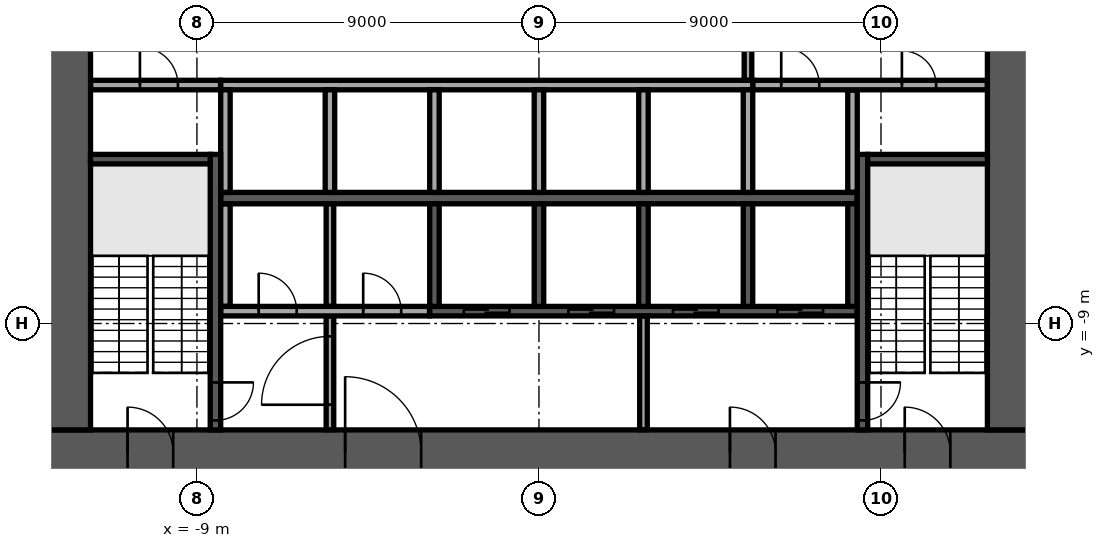
"""IFC4 building model, lengths in metres.
Left out: names, types, materials, properties, quantities, classifications, styles, units other than length and angle.
Written with IfcOpenShell. Run it as: python <this file> out.ifc"""

import sys

from ifc_helpers import new_model, si_unit, direction, frame, frame_2d, origin, place, context, subcontext, project, spatial, rectangle, extrude, element, fill, save


model = new_model("IFC4")
c1 = context("Model", 3, precision=1e-05, world=origin(), true_north=direction((0.0, 1.0)))
c2 = subcontext(c1, "Body", "Model", "MODEL_VIEW")
j1 = project(units=[si_unit("LENGTHUNIT", "METRE"), si_unit("PLANEANGLEUNIT", "RADIAN")], contexts=[c1])
p1 = place(None, origin())
s1 = spatial("IfcSite", under=j1, at=p1, CompositionType="ELEMENT")
p2 = place(p1, origin())
s2 = spatial("IfcBuilding", under=s1, at=p2, CompositionType="ELEMENT")
p3 = place(p2, frame((0.0, 0.0, 18.0)))
s3 = spatial("IfcBuildingStorey", under=s2, at=p3, CompositionType="ELEMENT", Elevation=18.0)
p4 = place(p3, frame((-13.0, -12.4, 0.0), z_axis=(0.0, 0.0, 1.0), x_axis=(1.0, 0.0, 0.0)))
e1 = element("IfcWall", 1, at=p4, inside=s3, PredefinedType="SHEAR", context=c2, shape_type="SweptSolid", body=[
    extrude(rectangle(XDim=26.0, YDim=1.2, at=frame_2d((13.0, 0.0))), origin(), (0.0, 0.0, 1.0), 4.05),
])
p5 = place(p4, frame((7.9, 0.0, 0.0)))
e2 = element("IfcOpeningElement", 2, at=p5, cuts=e1, PredefinedType="OPENING", context=c2, shape_type="SweptSolid", body=[
    extrude(rectangle(XDim=2.0, YDim=2.1, at=frame_2d((1.0, 1.05))), frame((0.0, 0.61, 0.0), z_axis=(0.0, -1.0, 0.0), x_axis=(1.0, 0.0, 0.0)), (0.0, 0.0, 1.0), 1.22),
])
p6 = place(p4, frame((18.025, 0.0, 0.0)))
e3 = element("IfcOpeningElement", 3, at=p6, cuts=e1, PredefinedType="OPENING", context=c2, shape_type="SweptSolid", body=[
    extrude(rectangle(XDim=1.2, YDim=2.1, at=frame_2d((0.6, 1.05))), frame((0.0, 0.61, 0.0), z_axis=(0.0, -1.0, 0.0), x_axis=(1.0, 0.0, 0.0)), (0.0, 0.0, 1.0), 1.22),
])
p7 = place(p4, frame((2.175, 0.0, 0.0)))
e4 = element("IfcOpeningElement", 4, at=p7, cuts=e1, PredefinedType="OPENING", context=c2, shape_type="SweptSolid", body=[
    extrude(rectangle(XDim=1.2, YDim=2.1, at=frame_2d((0.6, 1.05))), frame((0.0, 0.61, 0.0), z_axis=(0.0, -1.0, 0.0), x_axis=(1.0, 0.0, 0.0)), (0.0, 0.0, 1.0), 1.22),
])
p8 = place(p4, frame((22.625, 0.0, 0.0)))
e5 = element("IfcOpeningElement", 5, at=p8, cuts=e1, PredefinedType="OPENING", context=c2, shape_type="SweptSolid", body=[
    extrude(rectangle(XDim=1.2, YDim=2.1, at=frame_2d((0.6, 1.05))), frame((0.0, 0.61, 0.0), z_axis=(0.0, -1.0, 0.0), x_axis=(1.0, 0.0, 0.0)), (0.0, 0.0, 1.0), 1.22),
])
p9 = place(p3, frame((12.4, -11.8, 0.0), z_axis=(0.0, 0.0, 1.0), x_axis=(0.0, 1.0, 0.0)))
e6 = element("IfcWall", 6, at=p9, inside=s3, PredefinedType="SHEAR", context=c2, shape_type="SweptSolid", body=[
    extrude(rectangle(XDim=23.6, YDim=1.2, at=frame_2d((11.8, 0.0))), origin(), (0.0, 0.0, 1.0), 4.05),
])
p10 = place(p9, frame((10.6, 0.0, 0.0)))
e7 = element("IfcOpeningElement", 7, at=p10, cuts=e6, PredefinedType="OPENING", context=c2, shape_type="SweptSolid", body=[
    extrude(rectangle(XDim=2.4, YDim=2.4, at=frame_2d((1.2, 1.2))), frame((0.0, 0.61, 0.0), z_axis=(0.0, -1.0, 0.0), x_axis=(1.0, 0.0, 0.0)), (0.0, 0.0, 1.0), 1.22),
])
p11 = place(p3, frame((-12.4, -11.8, 0.0), z_axis=(0.0, 0.0, 1.0), x_axis=(0.0, 1.0, 0.0)))
e8 = element("IfcWall", 8, at=p11, inside=s3, PredefinedType="SHEAR", context=c2, shape_type="SweptSolid", body=[
    extrude(rectangle(XDim=23.6, YDim=1.2, at=frame_2d((11.8, 0.0))), origin(), (0.0, 0.0, 1.0), 4.05),
])
p12 = place(p11, frame((10.6, 0.0, 0.0)))
e9 = element("IfcOpeningElement", 9, at=p12, cuts=e8, PredefinedType="OPENING", context=c2, shape_type="SweptSolid", body=[
    extrude(rectangle(XDim=2.4, YDim=2.4, at=frame_2d((1.2, 1.2))), frame((0.0, 0.61, 0.0), z_axis=(0.0, -1.0, 0.0), x_axis=(1.0, 0.0, 0.0)), (0.0, 0.0, 1.0), 1.22),
])
p13 = place(p3, frame((-8.375, -5.7, 0.0), z_axis=(0.0, 0.0, 1.0), x_axis=(1.0, 0.0, 0.0)))
e10 = element("IfcWall", 10, at=p13, inside=s3, PredefinedType="SOLIDWALL", context=c2, shape_type="SweptSolid", body=[
    extrude(rectangle(XDim=16.75, YDim=0.3, at=frame_2d((8.375, 0.0))), origin(), (0.0, 0.0, 1.0), 4.05),
])
p14 = place(p3, frame((-8.375, -2.725, 0.0), z_axis=(0.0, 0.0, 1.0), x_axis=(1.0, 0.0, 0.0)))
e11 = element("IfcWall", 11, at=p14, inside=s3, PredefinedType="SOLIDWALL", context=c2, shape_type="SweptSolid", body=[
    extrude(rectangle(XDim=14.0, YDim=0.25, at=frame_2d((7.0, 0.0))), origin(), (0.0, 0.0, 1.0), 4.05),
])
for number, where, z_axis, x_axis in (
    (12, (-8.25, -5.55, 0.0), (0.0, 0.0, 1.0), (0.0, 1.0, 0.0)),
    (13, (-5.5, -5.55, 0.0), (0.0, 0.0, 1.0), (0.0, 1.0, 0.0)),
    (14, (-2.75, -5.55, 0.0), (0.0, 0.0, 1.0), (0.0, 1.0, 0.0)),
    (15, (0.0, -5.55, 0.0), (0.0, 0.0, 1.0), (0.0, 1.0, 0.0)),
    (16, (2.75, -5.55, 0.0), (0.0, 0.0, 1.0), (0.0, 1.0, 0.0)),
    (17, (5.5, -5.55, 0.0), (0.0, 0.0, 1.0), (0.0, 1.0, 0.0)),
):
    element("IfcWall", number, at=place(p3, frame(where, z_axis=z_axis, x_axis=x_axis)), inside=s3, PredefinedType="SOLIDWALL", context=c2, shape_type="SweptSolid", body=[
        extrude(rectangle(XDim=2.7, YDim=0.25, at=frame_2d((1.35, 0.0))), origin(), (0.0, 0.0, 1.0), 4.05),
    ])
p15 = place(p3, frame((-2.875, -8.675, 0.0), z_axis=(0.0, 0.0, 1.0), x_axis=(1.0, 0.0, 0.0)))
e18 = element("IfcWall", 18, at=p15, inside=s3, PredefinedType="SOLIDWALL", context=c2, shape_type="SweptSolid", body=[
    extrude(rectangle(XDim=11.25, YDim=0.25, at=frame_2d((5.625, 0.0))), origin(), (0.0, 0.0, 1.0), 4.05),
])
p16 = place(p15, frame((0.9, 0.0, 0.0)))
e19 = element("IfcOpeningElement", 19, at=p16, cuts=e18, PredefinedType="OPENING", context=c2, shape_type="SweptSolid", body=[
    extrude(rectangle(XDim=1.2, YDim=2.1, at=frame_2d((0.6, 1.05))), frame((0.0, 0.135, 0.0), z_axis=(0.0, -1.0, 0.0), x_axis=(1.0, 0.0, 0.0)), (0.0, 0.0, 1.0), 0.27),
])
p17 = place(p15, frame((3.65, 0.0, 0.0)))
e20 = element("IfcOpeningElement", 20, at=p17, cuts=e18, PredefinedType="OPENING", context=c2, shape_type="SweptSolid", body=[
    extrude(rectangle(XDim=1.2, YDim=2.1, at=frame_2d((0.6, 1.05))), frame((0.0, 0.135, 0.0), z_axis=(0.0, -1.0, 0.0), x_axis=(1.0, 0.0, 0.0)), (0.0, 0.0, 1.0), 0.27),
])
p18 = place(p15, frame((6.4, 0.0, 0.0)))
e21 = element("IfcOpeningElement", 21, at=p18, cuts=e18, PredefinedType="OPENING", context=c2, shape_type="SweptSolid", body=[
    extrude(rectangle(XDim=1.2, YDim=2.1, at=frame_2d((0.6, 1.05))), frame((0.0, 0.135, 0.0), z_axis=(0.0, -1.0, 0.0), x_axis=(1.0, 0.0, 0.0)), (0.0, 0.0, 1.0), 0.27),
])
p19 = place(p15, frame((9.15, 0.0, 0.0)))
e22 = element("IfcOpeningElement", 22, at=p19, cuts=e18, PredefinedType="OPENING", context=c2, shape_type="SweptSolid", body=[
    extrude(rectangle(XDim=1.2, YDim=2.1, at=frame_2d((0.6, 1.05))), frame((0.0, 0.135, 0.0), z_axis=(0.0, -1.0, 0.0), x_axis=(1.0, 0.0, 0.0)), (0.0, 0.0, 1.0), 0.27),
])
for number, where, z_axis, x_axis in (
    (23, (-2.75, -8.55, 0.0), (0.0, 0.0, 1.0), (0.0, 1.0, 0.0)),
    (24, (0.0, -8.55, 0.0), (0.0, 0.0, 1.0), (0.0, 1.0, 0.0)),
    (25, (2.75, -8.55, 0.0), (0.0, 0.0, 1.0), (0.0, 1.0, 0.0)),
    (26, (5.5, -8.55, 0.0), (0.0, 0.0, 1.0), (0.0, 1.0, 0.0)),
    (27, (8.25, -8.55, 0.0), (0.0, 0.0, 1.0), (0.0, 1.0, 0.0)),
):
    element("IfcWall", number, at=place(p3, frame(where, z_axis=z_axis, x_axis=x_axis)), inside=s3, PredefinedType="SOLIDWALL", context=c2, shape_type="SweptSolid", body=[
        extrude(rectangle(XDim=2.7, YDim=0.25, at=frame_2d((1.35, 0.0))), origin(), (0.0, 0.0, 1.0), 4.05),
    ])
p20 = place(p3, frame((-8.512, -4.55, 0.0), z_axis=(0.0, 0.0, 1.0), x_axis=(0.0, -1.0, 0.0)))
e28 = element("IfcWall", 28, at=p20, inside=s3, PredefinedType="SOLIDWALL", context=c2, shape_type="SweptSolid", body=[
    extrude(rectangle(XDim=7.25, YDim=0.275, at=frame_2d((3.625, 0.0))), origin(), (0.0, 0.0, 1.0), 4.05),
])
p21 = place(p20, frame((6.0, 0.0, 0.0)))
e29 = element("IfcOpeningElement", 29, at=p21, cuts=e28, PredefinedType="OPENING", context=c2, shape_type="SweptSolid", body=[
    extrude(rectangle(XDim=1.0, YDim=2.1, at=frame_2d((0.5, 1.05))), frame((0.0, 0.147, 0.0), z_axis=(0.0, -1.0, 0.0), x_axis=(1.0, 0.0, 0.0)), (0.0, 0.0, 1.0), 0.295),
])
p22 = place(p3, frame((-8.65, -4.675, 0.0), z_axis=(0.0, 0.0, 1.0), x_axis=(-1.0, 0.0, 0.0)))
e30 = element("IfcWall", 30, at=p22, inside=s3, PredefinedType="SOLIDWALL", context=c2, shape_type="SweptSolid", body=[
    extrude(rectangle(XDim=3.15, YDim=0.25, at=frame_2d((1.575, 0.0))), origin(), (0.0, 0.0, 1.0), 4.05),
])
p23 = place(p3, frame((8.512, -4.55, 0.0), z_axis=(0.0, 0.0, 1.0), x_axis=(0.0, -1.0, 0.0)))
e31 = element("IfcWall", 31, at=p23, inside=s3, PredefinedType="SOLIDWALL", context=c2, shape_type="SweptSolid", body=[
    extrude(rectangle(XDim=7.25, YDim=0.275, at=frame_2d((3.625, 0.0))), origin(), (0.0, 0.0, 1.0), 4.05),
])
p24 = place(p23, frame((6.0, 0.0, 0.0)))
e32 = element("IfcOpeningElement", 32, at=p24, cuts=e31, PredefinedType="OPENING", context=c2, shape_type="SweptSolid", body=[
    extrude(rectangle(XDim=1.0, YDim=2.1, at=frame_2d((0.5, 1.05))), frame((0.0, 0.147, 0.0), z_axis=(0.0, -1.0, 0.0), x_axis=(1.0, 0.0, 0.0)), (0.0, 0.0, 1.0), 0.295),
])
p25 = place(p3, frame((8.65, -4.675, 0.0), z_axis=(0.0, 0.0, 1.0), x_axis=(1.0, 0.0, 0.0)))
e33 = element("IfcWall", 33, at=p25, inside=s3, PredefinedType="SOLIDWALL", context=c2, shape_type="SweptSolid", body=[
    extrude(rectangle(XDim=3.15, YDim=0.25, at=frame_2d((1.575, 0.0))), origin(), (0.0, 0.0, 1.0), 4.05),
])
p26 = place(p3, frame((-5.5, -11.795, 0.0), z_axis=(0.0, 0.0, 1.0), x_axis=(0.0, 1.0, 0.0)))
e34 = element("IfcWall", 34, at=p26, inside=s3, PredefinedType="PARTITIONING", context=c2, shape_type="SweptSolid", body=[
    extrude(rectangle(XDim=2.99, YDim=0.2, at=frame_2d((1.495, 0.0))), origin(), (0.0, 0.0, 1.0), 4.05),
])
p27 = place(p26, frame((0.657, 0.0, 0.0)))
e35 = element("IfcOpeningElement", 35, at=p27, cuts=e34, PredefinedType="OPENING", context=c2, shape_type="SweptSolid", body=[
    extrude(rectangle(XDim=1.8, YDim=2.1, at=frame_2d((0.9, 1.05))), frame((0.0, 0.11, 0.0), z_axis=(0.0, -1.0, 0.0), x_axis=(1.0, 0.0, 0.0)), (0.0, 0.0, 1.0), 0.22),
])
p28 = place(p3, frame((2.75, -11.795, 0.0), z_axis=(0.0, 0.0, 1.0), x_axis=(0.0, 1.0, 0.0)))
e36 = element("IfcWall", 36, at=p28, inside=s3, PredefinedType="PARTITIONING", context=c2, shape_type="SweptSolid", body=[
    extrude(rectangle(XDim=2.99, YDim=0.2, at=frame_2d((1.495, 0.0))), origin(), (0.0, 0.0, 1.0), 4.05),
])
p29 = place(p3, frame((-8.37, -8.675, 0.0), z_axis=(0.0, 0.0, 1.0), x_axis=(1.0, 0.0, 0.0)))
e37 = element("IfcWall", 37, at=p29, inside=s3, PredefinedType="PARTITIONING", context=c2, shape_type="SweptSolid", body=[
    extrude(rectangle(XDim=5.49, YDim=0.25, at=frame_2d((2.745, 0.0))), origin(), (0.0, 0.0, 1.0), 4.05),
])
p30 = place(p29, frame((0.995, 0.0, 0.0)))
e38 = element("IfcOpeningElement", 38, at=p30, cuts=e37, PredefinedType="OPENING", context=c2, shape_type="SweptSolid", body=[
    extrude(rectangle(XDim=1.0, YDim=2.1, at=frame_2d((0.5, 1.05))), frame((0.0, 0.135, 0.0), z_axis=(0.0, -1.0, 0.0), x_axis=(1.0, 0.0, 0.0)), (0.0, 0.0, 1.0), 0.27),
])
p31 = place(p29, frame((3.745, 0.0, 0.0)))
e39 = element("IfcOpeningElement", 39, at=p31, cuts=e37, PredefinedType="OPENING", context=c2, shape_type="SweptSolid", body=[
    extrude(rectangle(XDim=1.0, YDim=2.1, at=frame_2d((0.5, 1.05))), frame((0.0, 0.135, 0.0), z_axis=(0.0, -1.0, 0.0), x_axis=(1.0, 0.0, 0.0)), (0.0, 0.0, 1.0), 0.27),
])
p32 = place(p3, frame((-8.25, -8.545, 0.0), z_axis=(0.0, 0.0, 1.0), x_axis=(0.0, 1.0, 0.0)))
e40 = element("IfcWall", 40, at=p32, inside=s3, PredefinedType="PARTITIONING", context=c2, shape_type="SweptSolid", body=[
    extrude(rectangle(XDim=2.69, YDim=0.25, at=frame_2d((1.345, 0.0))), origin(), (0.0, 0.0, 1.0), 4.05),
])
p33 = place(p3, frame((-5.5, -8.545, 0.0), z_axis=(0.0, 0.0, 1.0), x_axis=(0.0, 1.0, 0.0)))
e41 = element("IfcWall", 41, at=p33, inside=s3, PredefinedType="PARTITIONING", context=c2, shape_type="SweptSolid", body=[
    extrude(rectangle(XDim=2.69, YDim=0.2, at=frame_2d((1.345, 0.0))), origin(), (0.0, 0.0, 1.0), 4.05),
])
p34 = place(p3, frame((8.25, -5.545, 0.0), z_axis=(0.0, 0.0, 1.0), x_axis=(0.0, 1.0, 0.0)))
e42 = element("IfcWall", 42, at=p34, inside=s3, PredefinedType="PARTITIONING", context=c2, shape_type="SweptSolid", body=[
    extrude(rectangle(XDim=2.69, YDim=0.25, at=frame_2d((1.345, 0.0))), origin(), (0.0, 0.0, 1.0), 4.05),
])
p35 = place(p3, frame((-11.795, -2.725, 0.0), z_axis=(0.0, 0.0, 1.0), x_axis=(1.0, 0.0, 0.0)))
e43 = element("IfcWall", 43, at=p35, inside=s3, PredefinedType="PARTITIONING", context=c2, shape_type="SweptSolid", body=[
    extrude(rectangle(XDim=3.415, YDim=0.25, at=frame_2d((1.708, 0.0))), origin(), (0.0, 0.0, 1.0), 4.05),
])
p36 = place(p35, frame((1.295, 0.0, 0.0)))
e44 = element("IfcOpeningElement", 44, at=p36, cuts=e43, PredefinedType="OPENING", context=c2, shape_type="SweptSolid", body=[
    extrude(rectangle(XDim=1.0, YDim=2.1, at=frame_2d((0.5, 1.05))), frame((0.0, 0.135, 0.0), z_axis=(0.0, -1.0, 0.0), x_axis=(1.0, 0.0, 0.0)), (0.0, 0.0, 1.0), 0.27),
])
p37 = place(p3, frame((5.63, -2.725, 0.0), z_axis=(0.0, 0.0, 1.0), x_axis=(1.0, 0.0, 0.0)))
e45 = element("IfcWall", 45, at=p37, inside=s3, PredefinedType="PARTITIONING", context=c2, shape_type="SweptSolid", body=[
    extrude(rectangle(XDim=6.165, YDim=0.25, at=frame_2d((3.083, 0.0))), origin(), (0.0, 0.0, 1.0), 4.05),
])
p38 = place(p37, frame((0.745, 0.0, 0.0)))
e46 = element("IfcOpeningElement", 46, at=p38, cuts=e45, PredefinedType="OPENING", context=c2, shape_type="SweptSolid", body=[
    extrude(rectangle(XDim=1.0, YDim=2.1, at=frame_2d((0.5, 1.05))), frame((0.0, 0.135, 0.0), z_axis=(0.0, -1.0, 0.0), x_axis=(1.0, 0.0, 0.0)), (0.0, 0.0, 1.0), 0.27),
])
p39 = place(p37, frame((3.92, 0.0, 0.0)))
e47 = element("IfcOpeningElement", 47, at=p39, cuts=e45, PredefinedType="OPENING", context=c2, shape_type="SweptSolid", body=[
    extrude(rectangle(XDim=0.9, YDim=2.1, at=frame_2d((0.45, 1.05))), frame((0.0, 0.135, 0.0), z_axis=(0.0, -1.0, 0.0), x_axis=(1.0, 0.0, 0.0)), (0.0, 0.0, 1.0), 0.27),
])
p40 = place(p3, frame((5.5, -2.595, 0.0), z_axis=(0.0, 0.0, 1.0), x_axis=(0.0, 1.0, 0.0)))
e48 = element("IfcWall", 48, at=p40, inside=s3, PredefinedType="PARTITIONING", context=c2, shape_type="SweptSolid", body=[
    extrude(rectangle(XDim=5.19, YDim=0.2, at=frame_2d((2.595, 0.0))), origin(), (0.0, 0.0, 1.0), 4.05),
])
p41 = place(p40, frame((1.395, 0.0, 0.0)))
e49 = element("IfcOpeningElement", 49, at=p41, cuts=e48, PredefinedType="OPENING", context=c2, shape_type="SweptSolid", body=[
    extrude(rectangle(XDim=2.4, YDim=2.4, at=frame_2d((1.2, 1.2))), frame((0.0, 0.11, 0.0), z_axis=(0.0, -1.0, 0.0), x_axis=(1.0, 0.0, 0.0)), (0.0, 0.0, 1.0), 0.22),
])
p42 = place(p5, origin())
e50 = element("IfcDoor", 50, at=p42, inside=s3, OperationType="SINGLE_SWING_LEFT", PredefinedType="DOOR", context=c2, shape_type="SweptSolid", body=[
    extrude(rectangle(XDim=2.0, YDim=2.1, at=frame_2d((1.0, 1.05))), frame((0.0, 0.025, 0.0), z_axis=(0.0, -1.0, 0.0), x_axis=(1.0, 0.0, 0.0)), (0.0, 0.0, 1.0), 0.05),
])
fill(e2, e50)
p43 = place(p6, origin())
e51 = element("IfcDoor", 51, at=p43, inside=s3, OperationType="SINGLE_SWING_LEFT", PredefinedType="DOOR", context=c2, shape_type="SweptSolid", body=[
    extrude(rectangle(XDim=1.2, YDim=2.1, at=frame_2d((0.6, 1.05))), frame((0.0, 0.025, 0.0), z_axis=(0.0, -1.0, 0.0), x_axis=(1.0, 0.0, 0.0)), (0.0, 0.0, 1.0), 0.05),
])
fill(e3, e51)
p44 = place(p7, origin())
e52 = element("IfcDoor", 52, at=p44, inside=s3, OperationType="SINGLE_SWING_LEFT", PredefinedType="DOOR", context=c2, shape_type="SweptSolid", body=[
    extrude(rectangle(XDim=1.2, YDim=2.1, at=frame_2d((0.6, 1.05))), frame((0.0, 0.025, 0.0), z_axis=(0.0, -1.0, 0.0), x_axis=(1.0, 0.0, 0.0)), (0.0, 0.0, 1.0), 0.05),
])
fill(e4, e52)
p45 = place(p8, origin())
e53 = element("IfcDoor", 53, at=p45, inside=s3, OperationType="SINGLE_SWING_LEFT", PredefinedType="DOOR", context=c2, shape_type="SweptSolid", body=[
    extrude(rectangle(XDim=1.2, YDim=2.1, at=frame_2d((0.6, 1.05))), frame((0.0, 0.025, 0.0), z_axis=(0.0, -1.0, 0.0), x_axis=(1.0, 0.0, 0.0)), (0.0, 0.0, 1.0), 0.05),
])
fill(e5, e53)
p46 = place(p16, origin())
e54 = element("IfcDoor", 54, at=p46, inside=s3, OperationType="DOUBLE_DOOR_SLIDING", PredefinedType="DOOR", context=c2, shape_type="SweptSolid", body=[
    extrude(rectangle(XDim=1.2, YDim=2.1, at=frame_2d((0.6, 1.05))), frame((0.0, 0.025, 0.0), z_axis=(0.0, -1.0, 0.0), x_axis=(1.0, 0.0, 0.0)), (0.0, 0.0, 1.0), 0.05),
])
fill(e19, e54)
p47 = place(p17, origin())
e55 = element("IfcDoor", 55, at=p47, inside=s3, OperationType="DOUBLE_DOOR_SLIDING", PredefinedType="DOOR", context=c2, shape_type="SweptSolid", body=[
    extrude(rectangle(XDim=1.2, YDim=2.1, at=frame_2d((0.6, 1.05))), frame((0.0, 0.025, 0.0), z_axis=(0.0, -1.0, 0.0), x_axis=(1.0, 0.0, 0.0)), (0.0, 0.0, 1.0), 0.05),
])
fill(e20, e55)
p48 = place(p18, origin())
e56 = element("IfcDoor", 56, at=p48, inside=s3, OperationType="DOUBLE_DOOR_SLIDING", PredefinedType="DOOR", context=c2, shape_type="SweptSolid", body=[
    extrude(rectangle(XDim=1.2, YDim=2.1, at=frame_2d((0.6, 1.05))), frame((0.0, 0.025, 0.0), z_axis=(0.0, -1.0, 0.0), x_axis=(1.0, 0.0, 0.0)), (0.0, 0.0, 1.0), 0.05),
])
fill(e21, e56)
p49 = place(p19, origin())
e57 = element("IfcDoor", 57, at=p49, inside=s3, OperationType="DOUBLE_DOOR_SLIDING", PredefinedType="DOOR", context=c2, shape_type="SweptSolid", body=[
    extrude(rectangle(XDim=1.2, YDim=2.1, at=frame_2d((0.6, 1.05))), frame((0.0, 0.025, 0.0), z_axis=(0.0, -1.0, 0.0), x_axis=(1.0, 0.0, 0.0)), (0.0, 0.0, 1.0), 0.05),
])
fill(e22, e57)
p50 = place(p21, origin())
e58 = element("IfcDoor", 58, at=p50, inside=s3, OperationType="SINGLE_SWING_LEFT", PredefinedType="DOOR", context=c2, shape_type="SweptSolid", body=[
    extrude(rectangle(XDim=1.0, YDim=2.1, at=frame_2d((0.5, 1.05))), frame((0.0, 0.025, 0.0), z_axis=(0.0, -1.0, 0.0), x_axis=(1.0, 0.0, 0.0)), (0.0, 0.0, 1.0), 0.05),
])
fill(e29, e58)
p51 = place(p24, origin())
e59 = element("IfcDoor", 59, at=p51, inside=s3, OperationType="SINGLE_SWING_LEFT", PredefinedType="DOOR", context=c2, shape_type="SweptSolid", body=[
    extrude(rectangle(XDim=1.0, YDim=2.1, at=frame_2d((0.5, 1.05))), frame((0.0, 0.025, 0.0), z_axis=(0.0, -1.0, 0.0), x_axis=(1.0, 0.0, 0.0)), (0.0, 0.0, 1.0), 0.05),
])
fill(e32, e59)
p52 = place(p30, origin())
e60 = element("IfcDoor", 60, at=p52, inside=s3, OperationType="SINGLE_SWING_LEFT", PredefinedType="DOOR", context=c2, shape_type="SweptSolid", body=[
    extrude(rectangle(XDim=1.0, YDim=2.1, at=frame_2d((0.5, 1.05))), frame((0.0, 0.025, 0.0), z_axis=(0.0, -1.0, 0.0), x_axis=(1.0, 0.0, 0.0)), (0.0, 0.0, 1.0), 0.05),
])
fill(e38, e60)
p53 = place(p31, origin())
e61 = element("IfcDoor", 61, at=p53, inside=s3, OperationType="SINGLE_SWING_LEFT", PredefinedType="DOOR", context=c2, shape_type="SweptSolid", body=[
    extrude(rectangle(XDim=1.0, YDim=2.1, at=frame_2d((0.5, 1.05))), frame((0.0, 0.025, 0.0), z_axis=(0.0, -1.0, 0.0), x_axis=(1.0, 0.0, 0.0)), (0.0, 0.0, 1.0), 0.05),
])
fill(e39, e61)
p54 = place(p36, origin())
e62 = element("IfcDoor", 62, at=p54, inside=s3, OperationType="SINGLE_SWING_LEFT", PredefinedType="DOOR", context=c2, shape_type="SweptSolid", body=[
    extrude(rectangle(XDim=1.0, YDim=2.1, at=frame_2d((0.5, 1.05))), frame((0.0, 0.025, 0.0), z_axis=(0.0, -1.0, 0.0), x_axis=(1.0, 0.0, 0.0)), (0.0, 0.0, 1.0), 0.05),
])
fill(e44, e62)
p55 = place(p38, origin())
e63 = element("IfcDoor", 63, at=p55, inside=s3, OperationType="SINGLE_SWING_LEFT", PredefinedType="DOOR", context=c2, shape_type="SweptSolid", body=[
    extrude(rectangle(XDim=1.0, YDim=2.1, at=frame_2d((0.5, 1.05))), frame((0.0, 0.025, 0.0), z_axis=(0.0, -1.0, 0.0), x_axis=(1.0, 0.0, 0.0)), (0.0, 0.0, 1.0), 0.05),
])
fill(e46, e63)
p56 = place(p39, origin())
e64 = element("IfcDoor", 64, at=p56, inside=s3, OperationType="SINGLE_SWING_LEFT", PredefinedType="DOOR", context=c2, shape_type="SweptSolid", body=[
    extrude(rectangle(XDim=0.9, YDim=2.1, at=frame_2d((0.45, 1.05))), frame((0.0, 0.025, 0.0), z_axis=(0.0, -1.0, 0.0), x_axis=(1.0, 0.0, 0.0)), (0.0, 0.0, 1.0), 0.05),
])
fill(e47, e64)
p57 = place(p27, origin())
e65 = element("IfcDoor", 65, at=p57, inside=s3, OperationType="SINGLE_SWING_LEFT", PredefinedType="DOOR", context=c2, shape_type="SweptSolid", body=[
    extrude(rectangle(XDim=1.8, YDim=2.1, at=frame_2d((0.9, 1.05))), frame((0.0, 0.025, 0.0), z_axis=(0.0, -1.0, 0.0), x_axis=(1.0, 0.0, 0.0)), (0.0, 0.0, 1.0), 0.05),
])
fill(e35, e65)
save(model, sys.argv[1])
